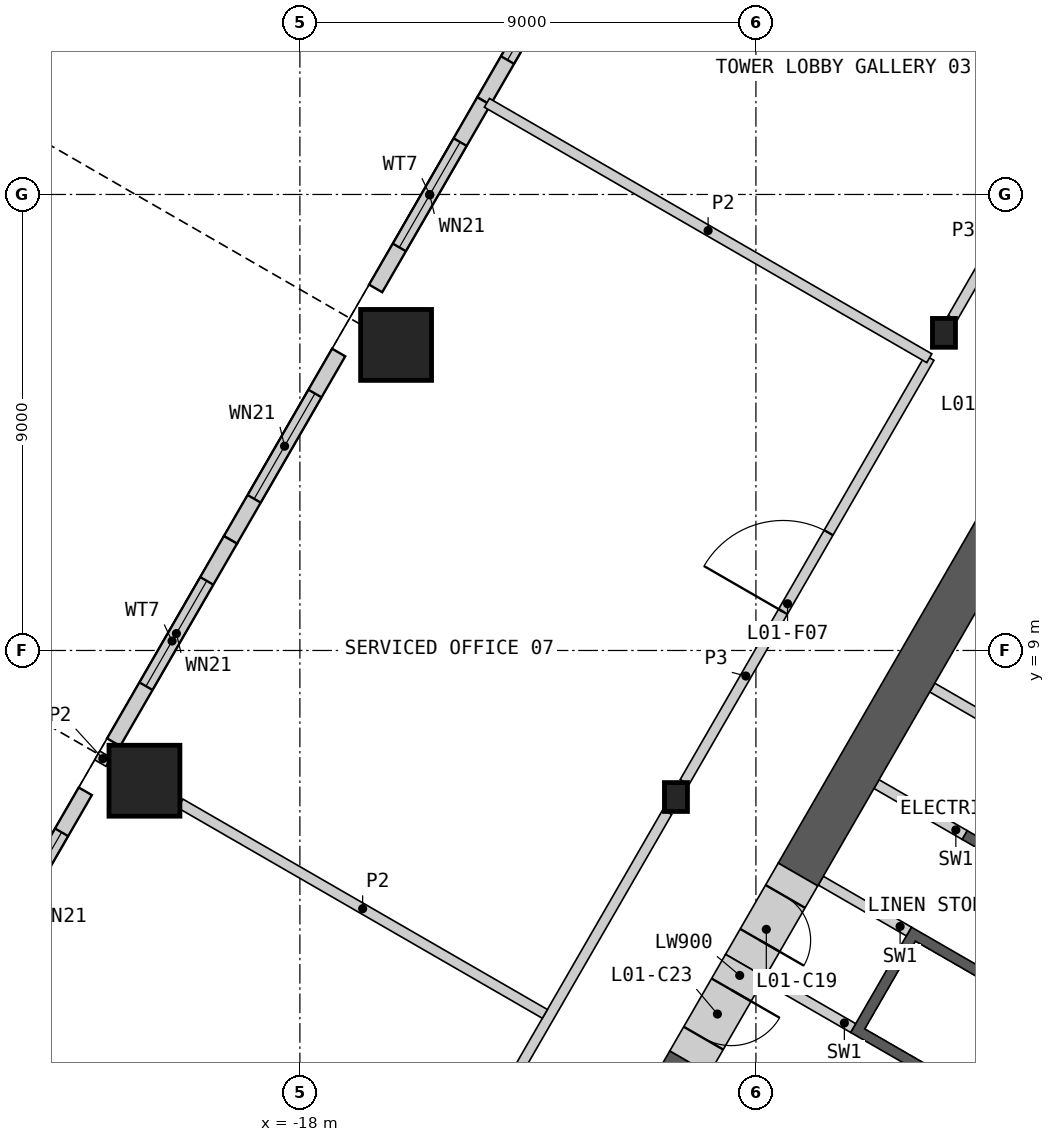
"""IFC4 building model, lengths in metres.
Left out: names, types, materials, properties, quantities, classifications, styles, units other than length and angle.
Written with IfcOpenShell. Run it as: python <this file> out.ifc"""

import sys

from ifc_helpers import new_model, si_unit, direction, frame, frame_2d, origin, origin_2d, place, context, subcontext, project, spatial, polyline, rectangle, hollow_rectangle, i_section, outline, extrude, element, fill, save


model = new_model("IFC4")
c1 = context("Model", 3, precision=1e-05, world=origin(), true_north=direction((0.0, 1.0)))
c2 = subcontext(c1, "Body", "Model", "MODEL_VIEW")
j1 = project(units=[si_unit("LENGTHUNIT", "METRE"), si_unit("PLANEANGLEUNIT", "RADIAN")], contexts=[c1])
p1 = place(None, origin())
s1 = spatial("IfcSite", under=j1, at=p1, CompositionType="ELEMENT")
p2 = place(p1, origin())
s2 = spatial("IfcBuilding", under=s1, at=p2, CompositionType="ELEMENT")
p3 = place(p2, frame((0.0, 0.0, 10.0)))
s3 = spatial("IfcBuildingStorey", under=s2, at=p3, CompositionType="ELEMENT", Elevation=10.0)
for number, where, z_axis, x_axis in (
    (1, (-16.102, 15.031, 0.0), (0.0, 0.0, 1.0), (1.0, 0.0, 0.0)),
    (2, (-21.068, 6.429, 0.0), (0.0, 0.0, 1.0), (1.0, 0.0, 0.0)),
):
    element("IfcColumn", number, at=place(p3, frame(where, z_axis=z_axis, x_axis=x_axis)), inside=s3, PredefinedType="COLUMN", context=c2, shape_type="SweptSolid", body=[
        extrude(hollow_rectangle(XDim=1.4, YDim=1.4, WallThickness=0.1, at=origin_2d()), origin(), (0.0, 0.0, 1.0), 5.5),
    ])
for number, where, z_axis, x_axis in (
    (3, (-5.289, 15.269, 0.0), (0.0, 0.0, 1.0), (1.0, 0.0, 0.0)),
    (4, (-10.578, 6.107, 0.0), (0.0, 0.0, 1.0), (1.0, 0.0, 0.0)),
):
    element("IfcColumn", number, at=place(p3, frame(where, z_axis=z_axis, x_axis=x_axis)), inside=s3, PredefinedType="COLUMN", context=c2, shape_type="SweptSolid", body=[
        extrude(i_section(OverallWidth=0.454, OverallDepth=0.57, WebThickness=0.078, FlangeThickness=0.125, at=origin_2d()), origin(), (0.0, 0.0, 1.0), 5.5),
    ])
p4 = place(p3, frame((-12.235, 23.542, 0.0), z_axis=(0.0, 0.0, 1.0), x_axis=(-0.499994660107, -0.866028486751, 0.0)))
e5 = element("IfcWall", 5, at=p4, inside=s3, PredefinedType="SOLIDWALL", context=c2, shape_type="SweptSolid", body=[
    extrude(rectangle(XDim=4.27, YDim=0.3, at=frame_2d((2.135, 0.0))), origin(), (0.0, 0.0, 1.0), 5.05),
])
p5 = place(p4, frame((0.935, 0.0, 0.9)))
e6 = element("IfcOpeningElement", 6, at=p5, cuts=e5, PredefinedType="OPENING", context=c2, shape_type="SweptSolid", body=[
    extrude(rectangle(XDim=2.4, YDim=3.0, at=frame_2d((1.2, 1.5))), frame((0.0, 0.16, 0.0), z_axis=(0.0, -1.0, 0.0), x_axis=(1.0, 0.0, 0.0)), (0.0, 0.0, 1.0), 0.32),
])
p6 = place(p3, frame((-14.37, 19.844, 0.0), z_axis=(0.0, 0.0, 1.0), x_axis=(-0.500019418418, -0.866014192265, 0.0)))
e7 = element("IfcWall", 7, at=p6, inside=s3, PredefinedType="SOLIDWALL", context=c2, shape_type="SweptSolid", body=[
    extrude(rectangle(XDim=4.27, YDim=0.3, at=frame_2d((2.135, 0.0))), origin(), (0.0, 0.0, 1.0), 5.05),
])
p7 = place(p6, frame((0.935, 0.0, 0.9)))
e8 = element("IfcOpeningElement", 8, at=p7, cuts=e7, PredefinedType="OPENING", context=c2, shape_type="SweptSolid", body=[
    extrude(rectangle(XDim=2.4, YDim=3.0, at=frame_2d((1.2, 1.5))), frame((0.0, 0.16, 0.0), z_axis=(0.0, -1.0, 0.0), x_axis=(1.0, 0.0, 0.0)), (0.0, 0.0, 1.0), 0.32),
])
p8 = place(p3, frame((-17.235, 14.881, 0.0), z_axis=(0.0, 0.0, 1.0), x_axis=(-0.499994660107, -0.866028486751, 0.0)))
e9 = element("IfcWall", 9, at=p8, inside=s3, PredefinedType="SOLIDWALL", context=c2, shape_type="SweptSolid", body=[
    extrude(rectangle(XDim=4.27, YDim=0.3, at=frame_2d((2.135, 0.0))), origin(), (0.0, 0.0, 1.0), 5.05),
])
p9 = place(p8, frame((0.935, 0.0, 0.9)))
e10 = element("IfcOpeningElement", 10, at=p9, cuts=e9, PredefinedType="OPENING", context=c2, shape_type="SweptSolid", body=[
    extrude(rectangle(XDim=2.4, YDim=3.0, at=frame_2d((1.2, 1.5))), frame((0.0, 0.16, 0.0), z_axis=(0.0, -1.0, 0.0), x_axis=(1.0, 0.0, 0.0)), (0.0, 0.0, 1.0), 0.32),
])
p10 = place(p3, frame((-19.37, 11.183, 0.0), z_axis=(0.0, 0.0, 1.0), x_axis=(-0.499982117899, -0.866035727774, 0.0)))
e11 = element("IfcWall", 11, at=p10, inside=s3, PredefinedType="SOLIDWALL", context=c2, shape_type="SweptSolid", body=[
    extrude(rectangle(XDim=4.612, YDim=0.3, at=frame_2d((2.306, 0.0))), origin(), (0.0, 0.0, 1.0), 5.05),
])
p11 = place(p10, frame((0.935, 0.0, 0.9)))
e12 = element("IfcOpeningElement", 12, at=p11, cuts=e11, PredefinedType="OPENING", context=c2, shape_type="SweptSolid", body=[
    extrude(rectangle(XDim=2.4, YDim=3.0, at=frame_2d((1.2, 1.5))), frame((0.0, 0.16, 0.0), z_axis=(0.0, -1.0, 0.0), x_axis=(1.0, 0.0, 0.0)), (0.0, 0.0, 1.0), 0.32),
])
p12 = place(p3, frame((-22.235, 6.221, 0.0), z_axis=(0.0, 0.0, 1.0), x_axis=(-0.500019418418, -0.866014192265, 0.0)))
e13 = element("IfcWall", 13, at=p12, inside=s3, PredefinedType="SOLIDWALL", context=c2, shape_type="SweptSolid", body=[
    extrude(rectangle(XDim=4.27, YDim=0.3, at=frame_2d((2.135, 0.0))), origin(), (0.0, 0.0, 1.0), 5.05),
])
p13 = place(p12, frame((0.935, 0.0, 0.9)))
e14 = element("IfcOpeningElement", 14, at=p13, cuts=e13, PredefinedType="OPENING", context=c2, shape_type="SweptSolid", body=[
    extrude(rectangle(XDim=2.4, YDim=3.0, at=frame_2d((1.2, 1.5))), frame((0.0, 0.16, 0.0), z_axis=(0.0, -1.0, 0.0), x_axis=(1.0, 0.0, 0.0)), (0.0, 0.0, 1.0), 0.32),
])
p14 = place(p3, origin())
e15 = element("IfcWall", 15, at=p14, inside=s3, PredefinedType="SHEAR", context=c2, shape_type="SweptSolid", body=[
    extrude(outline(polyline([(-4.96, 0.208), (-7.131, 1.461), (-5.931, 3.54), (-3.76, 2.287), (-3.861, 2.113), (-5.852, 3.263), (-6.852, 1.531), (-4.861, 0.381), (-4.96, 0.208)])), origin(), (0.0, 0.0, 1.0), 5.05),
])
p15 = place(p3, origin())
e16 = element("IfcWall", 16, at=p15, inside=s3, PredefinedType="SHEAR", context=c2, shape_type="SweptSolid", body=[
    extrude(outline(polyline([(-2.76, 4.019), (-4.931, 5.272), (-4.831, 5.445), (-2.66, 4.192), (-2.76, 4.019)])), origin(), (0.0, 0.0, 1.0), 5.05),
])
p16 = place(p3, frame((-1.631, 5.776, 0.0), z_axis=(0.0, 0.0, 1.0), x_axis=(-0.499992876559, -0.866029516466, 0.0)))
e17 = element("IfcWall", 17, at=p16, inside=s3, PredefinedType="SOLIDWALL", context=c2, shape_type="SweptSolid", body=[
    extrude(rectangle(XDim=6.486, YDim=0.2, at=frame_2d((3.243, 0.0))), origin(), (0.0, 0.0, 1.0), 5.05),
])
p17 = place(p16, frame((0.437, 0.0, 0.0)))
e18 = element("IfcOpeningElement", 18, at=p17, cuts=e17, PredefinedType="OPENING", context=c2, shape_type="SweptSolid", body=[
    extrude(rectangle(XDim=0.9, YDim=2.1, at=frame_2d((0.45, 1.05))), frame((0.0, 0.11, 0.0), z_axis=(0.0, -1.0, 0.0), x_axis=(1.0, 0.0, 0.0)), (0.0, 0.0, 1.0), 0.22),
])
p18 = place(p16, frame((2.637, 0.0, 0.0)))
e19 = element("IfcOpeningElement", 19, at=p18, cuts=e17, PredefinedType="OPENING", context=c2, shape_type="SweptSolid", body=[
    extrude(rectangle(XDim=0.9, YDim=2.1, at=frame_2d((0.45, 1.05))), frame((0.0, 0.11, 0.0), z_axis=(0.0, -1.0, 0.0), x_axis=(1.0, 0.0, 0.0)), (0.0, 0.0, 1.0), 0.22),
])
p19 = place(p3, frame((-3.781, 7.263, 0.0), z_axis=(0.0, 0.0, 1.0), x_axis=(-0.865983199114, 0.50007309351, 0.0)))
e20 = element("IfcWall", 20, at=p19, inside=s3, PredefinedType="SHEAR", context=c2, shape_type="SweptSolid", body=[
    extrude(rectangle(XDim=2.009, YDim=0.2, at=frame_2d((1.004, 0.0))), origin(), (0.0, 0.0, 1.0), 5.05),
])
p20 = place(p3, frame((-4.881, 5.358, 0.0), z_axis=(0.0, 0.0, 1.0), x_axis=(-0.866035824272, 0.499981950752, 0.0)))
e21 = element("IfcWall", 21, at=p20, inside=s3, PredefinedType="SHEAR", context=c2, shape_type="SweptSolid", body=[
    extrude(rectangle(XDim=2.009, YDim=0.2, at=frame_2d((1.004, 0.0))), origin(), (0.0, 0.0, 1.0), 5.05),
])
p21 = place(p3, frame((-5.981, 3.453, 0.0), z_axis=(0.0, 0.0, 1.0), x_axis=(-0.866013584312, 0.500020471368, 0.0)))
e22 = element("IfcWall", 22, at=p21, inside=s3, PredefinedType="SHEAR", context=c2, shape_type="SweptSolid", body=[
    extrude(rectangle(XDim=2.009, YDim=0.2, at=frame_2d((1.005, 0.0))), origin(), (0.0, 0.0, 1.0), 5.05),
])
p22 = place(p3, frame((-7.081, 1.548, 0.0), z_axis=(0.0, 0.0, 1.0), x_axis=(-0.865983199114, 0.50007309351, 0.0)))
e23 = element("IfcWall", 23, at=p22, inside=s3, PredefinedType="SHEAR", context=c2, shape_type="SweptSolid", body=[
    extrude(rectangle(XDim=2.009, YDim=0.2, at=frame_2d((1.004, 0.0))), origin(), (0.0, 0.0, 1.0), 5.05),
])
p23 = place(p3, frame((-3.675, 12.365, 0.0), z_axis=(0.0, 0.0, 1.0), x_axis=(-0.500014716158, -0.86601690724, 0.0)))
e24 = element("IfcWall", 24, at=p23, inside=s3, PredefinedType="SHEAR", context=c2, shape_type="SweptSolid", body=[
    extrude(rectangle(XDim=8.99, YDim=0.9, at=frame_2d((4.495, 0.0))), origin(), (0.0, 0.0, 1.0), 5.05),
])
p24 = place(p3, frame((-10.31, 0.872, 0.0), z_axis=(0.0, 0.0, 1.0), x_axis=(-0.499991893987, -0.866030083742, 0.0)))
e25 = element("IfcWall", 25, at=p24, inside=s3, PredefinedType="SHEAR", context=c2, shape_type="SweptSolid", body=[
    extrude(rectangle(XDim=4.471, YDim=0.9, at=frame_2d((2.235, 0.0))), origin(), (0.0, 0.0, 1.0), 5.05),
])
p25 = place(p3, frame((-8.17, 4.579, 0.0), z_axis=(0.0, 0.0, 1.0), x_axis=(-0.499888406853, -0.866089822532, 0.0)))
e26 = element("IfcWall", 26, at=p25, inside=s3, PredefinedType="SHEAR", context=c2, shape_type="SweptSolid", body=[
    extrude(rectangle(XDim=2.08, YDim=0.9, at=frame_2d((1.04, 0.0))), origin(), (0.0, 0.0, 1.0), 5.05),
])
p26 = place(p25, frame((0.5, 0.0, 0.0)))
e27 = element("IfcOpeningElement", 27, at=p26, cuts=e26, PredefinedType="OPENING", context=c2, shape_type="SweptSolid", body=[
    extrude(rectangle(XDim=1.0, YDim=2.1, at=frame_2d((0.5, 1.05))), frame((0.0, 0.46, 0.0), z_axis=(0.0, -1.0, 0.0), x_axis=(1.0, 0.0, 0.0)), (0.0, 0.0, 1.0), 0.92),
])
p27 = place(p3, frame((-9.21, 2.777, 0.0), z_axis=(0.0, 0.0, 1.0), x_axis=(-0.500077893725, -0.86598042715, 0.0)))
e28 = element("IfcWall", 28, at=p27, inside=s3, PredefinedType="SHEAR", context=c2, shape_type="SweptSolid", body=[
    extrude(rectangle(XDim=2.2, YDim=0.9, at=frame_2d((1.1, 0.0))), origin(), (0.0, 0.0, 1.0), 5.05),
])
p28 = place(p27, frame((0.55, 0.0, 0.0)))
e29 = element("IfcOpeningElement", 29, at=p28, cuts=e28, PredefinedType="OPENING", context=c2, shape_type="SweptSolid", body=[
    extrude(rectangle(XDim=1.1, YDim=2.1, at=frame_2d((0.55, 1.05))), frame((0.0, 0.46, 0.0), z_axis=(0.0, -1.0, 0.0), x_axis=(1.0, 0.0, 0.0)), (0.0, 0.0, 1.0), 0.92),
])
p29 = place(p3, frame((-15.698, -2.759, 0.0), z_axis=(0.0, 0.0, 1.0), x_axis=(0.500004292778, 0.866022925334, 0.0)))
e30 = element("IfcWall", 30, at=p29, inside=s3, PredefinedType="PARTITIONING", context=c2, shape_type="SweptSolid", body=[
    extrude(rectangle(XDim=9.898, YDim=0.2, at=frame_2d((4.949, 0.0))), origin(), (0.0, 0.0, 1.0), 5.05),
])
p30 = place(p3, frame((-10.408, 6.402, 0.0), z_axis=(0.0, 0.0, 1.0), x_axis=(0.499986904098, 0.866032964575, 0.0)))
e31 = element("IfcWall", 31, at=p30, inside=s3, PredefinedType="PARTITIONING", context=c2, shape_type="SweptSolid", body=[
    extrude(rectangle(XDim=9.67, YDim=0.2, at=frame_2d((4.835, 0.0))), origin(), (0.0, 0.0, 1.0), 5.05),
])
p31 = place(p30, frame((3.884, 0.0, 0.0)))
e32 = element("IfcOpeningElement", 32, at=p31, cuts=e31, PredefinedType="OPENING", context=c2, shape_type="SweptSolid", body=[
    extrude(rectangle(XDim=1.8, YDim=2.1, at=frame_2d((0.9, 1.05))), frame((0.0, 0.11, 0.0), z_axis=(0.0, -1.0, 0.0), x_axis=(1.0, 0.0, 0.0)), (0.0, 0.0, 1.0), 0.22),
])
p32 = place(p3, frame((-5.119, 15.563, 0.0), z_axis=(0.0, 0.0, 1.0), x_axis=(0.500004801114, 0.866022631842, 0.0)))
e33 = element("IfcWall", 33, at=p32, inside=s3, PredefinedType="PARTITIONING", context=c2, shape_type="SweptSolid", body=[
    extrude(rectangle(XDim=6.412, YDim=0.2, at=frame_2d((3.206, 0.0))), origin(), (0.0, 0.0, 1.0), 5.05),
])
p33 = place(p32, frame((2.656, 0.0, 0.0)))
e34 = element("IfcOpeningElement", 34, at=p33, cuts=e33, PredefinedType="OPENING", context=c2, shape_type="SweptSolid", body=[
    extrude(rectangle(XDim=1.0, YDim=2.1, at=frame_2d((0.5, 1.05))), frame((0.0, 0.11, 0.0), z_axis=(0.0, -1.0, 0.0), x_axis=(1.0, 0.0, 0.0)), (0.0, 0.0, 1.0), 0.22),
])
p34 = place(p3, frame((-14.31, 19.809, 0.0), z_axis=(0.0, 0.0, 1.0), x_axis=(0.866017018378, -0.500014523669, 0.0)))
e35 = element("IfcWall", 35, at=p34, inside=s3, PredefinedType="PARTITIONING", context=c2, shape_type="SweptSolid", body=[
    extrude(rectangle(XDim=10.082, YDim=0.2, at=frame_2d((5.041, 0.0))), origin(), (0.0, 0.0, 1.0), 5.05),
])
p35 = place(p3, frame((-20.358, 5.98, 0.0), z_axis=(0.0, 0.0, 1.0), x_axis=(0.866036778076, -0.499980298632, 0.0)))
e36 = element("IfcWall", 36, at=p35, inside=s3, PredefinedType="PARTITIONING", context=c2, shape_type="SweptSolid", body=[
    extrude(rectangle(XDim=8.305, YDim=0.2, at=frame_2d((4.153, 0.0))), origin(), (0.0, 0.0, 1.0), 5.05),
])
p36 = place(p3, frame((-22.0, 6.928, 0.0), z_axis=(0.0, 0.0, 1.0), x_axis=(0.866185586049, -0.49972245349, 0.0)))
e37 = element("IfcWall", 37, at=p36, inside=s3, PredefinedType="PARTITIONING", context=c2, shape_type="SweptSolid", body=[
    extrude(rectangle(XDim=0.257, YDim=0.2, at=frame_2d((0.128, 0.0))), origin(), (0.0, 0.0, 1.0), 5.05),
])
p37 = place(p5, origin())
e38 = element("IfcWindow", 38, at=p37, inside=s3, PartitioningType="SINGLE_PANEL", PredefinedType="WINDOW", context=c2, shape_type="SweptSolid", body=[
    extrude(rectangle(XDim=2.4, YDim=3.0, at=frame_2d((1.2, 1.5))), frame((0.0, 0.03, 0.0), z_axis=(0.0, -1.0, 0.0), x_axis=(1.0, 0.0, 0.0)), (0.0, 0.0, 1.0), 0.06),
])
fill(e6, e38)
p38 = place(p7, origin())
e39 = element("IfcWindow", 39, at=p38, inside=s3, PartitioningType="SINGLE_PANEL", PredefinedType="WINDOW", context=c2, shape_type="SweptSolid", body=[
    extrude(rectangle(XDim=2.4, YDim=3.0, at=frame_2d((1.2, 1.5))), frame((0.0, 0.03, 0.0), z_axis=(0.0, -1.0, 0.0), x_axis=(1.0, 0.0, 0.0)), (0.0, 0.0, 1.0), 0.06),
])
fill(e8, e39)
p39 = place(p9, origin())
e40 = element("IfcWindow", 40, at=p39, inside=s3, PartitioningType="SINGLE_PANEL", PredefinedType="WINDOW", context=c2, shape_type="SweptSolid", body=[
    extrude(rectangle(XDim=2.4, YDim=3.0, at=frame_2d((1.2, 1.5))), frame((0.0, 0.03, 0.0), z_axis=(0.0, -1.0, 0.0), x_axis=(1.0, 0.0, 0.0)), (0.0, 0.0, 1.0), 0.06),
])
fill(e10, e40)
p40 = place(p11, origin())
e41 = element("IfcWindow", 41, at=p40, inside=s3, PartitioningType="SINGLE_PANEL", PredefinedType="WINDOW", context=c2, shape_type="SweptSolid", body=[
    extrude(rectangle(XDim=2.4, YDim=3.0, at=frame_2d((1.2, 1.5))), frame((0.0, 0.03, 0.0), z_axis=(0.0, -1.0, 0.0), x_axis=(1.0, 0.0, 0.0)), (0.0, 0.0, 1.0), 0.06),
])
fill(e12, e41)
p41 = place(p13, origin())
e42 = element("IfcWindow", 42, at=p41, inside=s3, PartitioningType="SINGLE_PANEL", PredefinedType="WINDOW", context=c2, shape_type="SweptSolid", body=[
    extrude(rectangle(XDim=2.4, YDim=3.0, at=frame_2d((1.2, 1.5))), frame((0.0, 0.03, 0.0), z_axis=(0.0, -1.0, 0.0), x_axis=(1.0, 0.0, 0.0)), (0.0, 0.0, 1.0), 0.06),
])
fill(e14, e42)
p42 = place(p26, origin())
e43 = element("IfcDoor", 43, at=p42, inside=s3, OperationType="SINGLE_SWING_RIGHT", PredefinedType="DOOR", context=c2, shape_type="SweptSolid", body=[
    extrude(rectangle(XDim=1.0, YDim=2.1, at=frame_2d((0.5, 1.05))), frame((0.0, 0.205, 0.0), z_axis=(0.0, -1.0, 0.0), x_axis=(1.0, 0.0, 0.0)), (0.0, 0.0, 1.0), 0.05),
])
fill(e27, e43)
p43 = place(p28, origin())
e44 = element("IfcDoor", 44, at=p43, inside=s3, OperationType="SINGLE_SWING_LEFT", PredefinedType="DOOR", context=c2, shape_type="SweptSolid", body=[
    extrude(rectangle(XDim=1.1, YDim=2.1, at=frame_2d((0.55, 1.05))), frame((0.0, 0.205, 0.0), z_axis=(0.0, -1.0, 0.0), x_axis=(1.0, 0.0, 0.0)), (0.0, 0.0, 1.0), 0.05),
])
fill(e29, e44)
p44 = place(p31, origin())
e45 = element("IfcDoor", 45, at=p44, inside=s3, OperationType="DOUBLE_DOOR_SINGLE_SWING", PredefinedType="DOOR", context=c2, shape_type="SweptSolid", body=[
    extrude(rectangle(XDim=1.8, YDim=2.1, at=frame_2d((0.9, 1.05))), frame((0.0, 0.025, 0.0), z_axis=(0.0, -1.0, 0.0), x_axis=(1.0, 0.0, 0.0)), (0.0, 0.0, 1.0), 0.05),
])
fill(e32, e45)
save(model, sys.argv[1])
